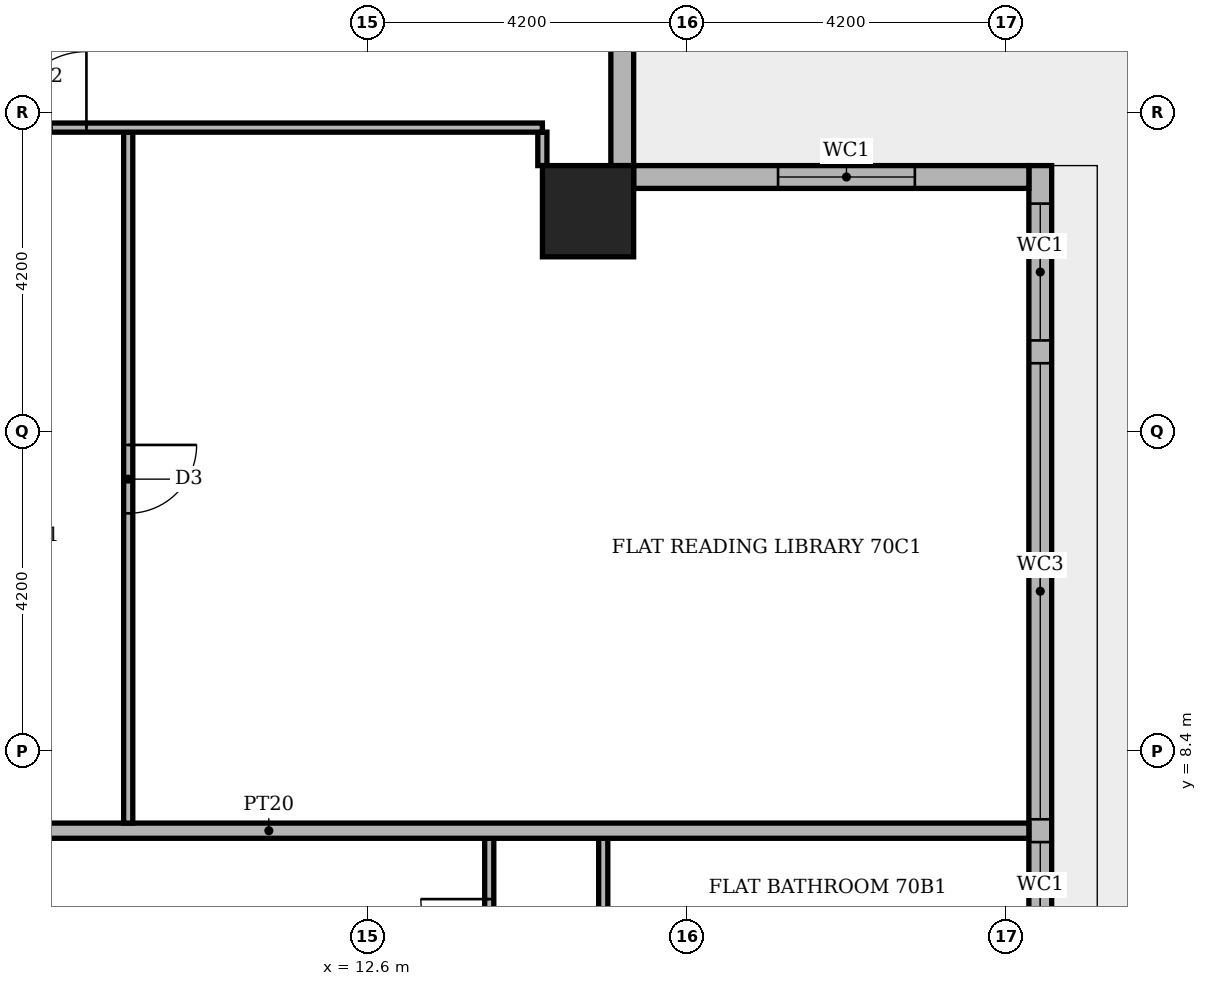
"""IFC4 building model, lengths in metres.
Left out: names, types, materials, properties, quantities, classifications, styles, units other than length and angle.
Written with IfcOpenShell. Run it as: python <this file> out.ifc"""

import sys

from ifc_helpers import new_model, si_unit, direction, frame, frame_2d, origin, origin_2d, place, context, subcontext, project, spatial, rectangle, extrude, element, fill, save


model = new_model("IFC4")
c1 = context("Model", 3, precision=1e-05, world=origin(), true_north=direction((0.0, 1.0)))
c2 = subcontext(c1, "Body", "Model", "MODEL_VIEW")
j1 = project(units=[si_unit("LENGTHUNIT", "METRE"), si_unit("PLANEANGLEUNIT", "RADIAN")], contexts=[c1])
p1 = place(None, origin())
s1 = spatial("IfcSite", under=j1, at=p1, CompositionType="ELEMENT")
p2 = place(p1, origin())
s2 = spatial("IfcBuilding", under=s1, at=p2, CompositionType="ELEMENT")
p3 = place(p2, frame((0.0, 0.0, 292.8)))
s3 = spatial("IfcBuildingStorey", under=s2, at=p3, CompositionType="ELEMENT", Elevation=292.8)
p4 = place(p3, frame((15.5, 15.5, -0.35), z_axis=(0.0, 0.0, 1.0), x_axis=(1.0, 0.0, 0.0)))
e1 = element("IfcColumn", 1, at=p4, inside=s3, PredefinedType="COLUMN", context=c2, shape_type="SweptSolid", body=[
    extrude(rectangle(XDim=1.2, YDim=1.2, at=origin_2d()), origin(), (0.0, 0.0, 1.0), 4.25),
])
p5 = place(p3, frame((21.45, -15.8, 0.0), z_axis=(0.0, 0.0, 1.0), x_axis=(0.0, 1.0, 0.0)))
e2 = element("IfcWall", 2, at=p5, inside=s3, PredefinedType="STANDARD", context=c2, shape_type="SweptSolid", body=[
    extrude(rectangle(XDim=31.9, YDim=0.3, at=frame_2d((15.95, 0.0))), origin(), (0.0, 0.0, 1.0), 3.55),
])
p6 = place(p5, frame((0.2, 0.0, 0.6)))
e3 = element("IfcOpeningElement", 3, at=p6, cuts=e2, PredefinedType="OPENING", context=c2, shape_type="SweptSolid", body=[
    extrude(rectangle(XDim=3.9, YDim=2.4, at=frame_2d((1.95, 1.2))), frame((0.0, 0.16, 0.0), z_axis=(0.0, -1.0, 0.0), x_axis=(1.0, 0.0, 0.0)), (0.0, 0.0, 1.0), 0.32),
])
p7 = place(p5, frame((4.4, 0.0, 0.0)))
e4 = element("IfcOpeningElement", 4, at=p7, cuts=e2, PredefinedType="OPENING", context=c2, shape_type="SweptSolid", body=[
    extrude(rectangle(XDim=3.9, YDim=2.4, at=frame_2d((1.95, 1.2))), frame((0.0, 0.16, 0.0), z_axis=(0.0, -1.0, 0.0), x_axis=(1.0, 0.0, 0.0)), (0.0, 0.0, 1.0), 0.32),
])
p8 = place(p5, frame((8.6, 0.0, 0.6)))
e5 = element("IfcOpeningElement", 5, at=p8, cuts=e2, PredefinedType="OPENING", context=c2, shape_type="SweptSolid", body=[
    extrude(rectangle(XDim=1.8, YDim=2.4, at=frame_2d((0.9, 1.2))), frame((0.0, 0.16, 0.0), z_axis=(0.0, -1.0, 0.0), x_axis=(1.0, 0.0, 0.0)), (0.0, 0.0, 1.0), 0.32),
])
p9 = place(p5, frame((10.7, 0.0, 0.6)))
e6 = element("IfcOpeningElement", 6, at=p9, cuts=e2, PredefinedType="OPENING", context=c2, shape_type="SweptSolid", body=[
    extrude(rectangle(XDim=1.8, YDim=2.4, at=frame_2d((0.9, 1.2))), frame((0.0, 0.16, 0.0), z_axis=(0.0, -1.0, 0.0), x_axis=(1.0, 0.0, 0.0)), (0.0, 0.0, 1.0), 0.32),
])
p10 = place(p5, frame((12.8, 0.0, 0.0)))
e7 = element("IfcOpeningElement", 7, at=p10, cuts=e2, PredefinedType="OPENING", context=c2, shape_type="SweptSolid", body=[
    extrude(rectangle(XDim=3.9, YDim=2.4, at=frame_2d((1.95, 1.2))), frame((0.0, 0.16, 0.0), z_axis=(0.0, -1.0, 0.0), x_axis=(1.0, 0.0, 0.0)), (0.0, 0.0, 1.0), 0.32),
])
p11 = place(p5, frame((17.0, 0.0, 0.6)))
e8 = element("IfcOpeningElement", 8, at=p11, cuts=e2, PredefinedType="OPENING", context=c2, shape_type="SweptSolid", body=[
    extrude(rectangle(XDim=1.8, YDim=2.4, at=frame_2d((0.9, 1.2))), frame((0.0, 0.16, 0.0), z_axis=(0.0, -1.0, 0.0), x_axis=(1.0, 0.0, 0.0)), (0.0, 0.0, 1.0), 0.32),
])
p12 = place(p5, frame((19.1, 0.0, 0.6)))
e9 = element("IfcOpeningElement", 9, at=p12, cuts=e2, PredefinedType="OPENING", context=c2, shape_type="SweptSolid", body=[
    extrude(rectangle(XDim=1.8, YDim=2.4, at=frame_2d((0.9, 1.2))), frame((0.0, 0.16, 0.0), z_axis=(0.0, -1.0, 0.0), x_axis=(1.0, 0.0, 0.0)), (0.0, 0.0, 1.0), 0.32),
])
p13 = place(p5, frame((21.2, 0.0, 0.6)))
e10 = element("IfcOpeningElement", 10, at=p13, cuts=e2, PredefinedType="OPENING", context=c2, shape_type="SweptSolid", body=[
    extrude(rectangle(XDim=1.8, YDim=2.4, at=frame_2d((0.9, 1.2))), frame((0.0, 0.16, 0.0), z_axis=(0.0, -1.0, 0.0), x_axis=(1.0, 0.0, 0.0)), (0.0, 0.0, 1.0), 0.32),
])
p14 = place(p5, frame((23.3, 0.0, 0.6)))
e11 = element("IfcOpeningElement", 11, at=p14, cuts=e2, PredefinedType="OPENING", context=c2, shape_type="SweptSolid", body=[
    extrude(rectangle(XDim=6.0, YDim=2.4, at=frame_2d((3.0, 1.2))), frame((0.0, 0.16, 0.0), z_axis=(0.0, -1.0, 0.0), x_axis=(1.0, 0.0, 0.0)), (0.0, 0.0, 1.0), 0.32),
])
p15 = place(p5, frame((29.6, 0.0, 0.6)))
e12 = element("IfcOpeningElement", 12, at=p15, cuts=e2, PredefinedType="OPENING", context=c2, shape_type="SweptSolid", body=[
    extrude(rectangle(XDim=1.8, YDim=2.4, at=frame_2d((0.9, 1.2))), frame((0.0, 0.16, 0.0), z_axis=(0.0, -1.0, 0.0), x_axis=(1.0, 0.0, 0.0)), (0.0, 0.0, 1.0), 0.32),
])
p16 = place(p3, frame((21.3, 15.95, 0.0), z_axis=(0.0, 0.0, 1.0), x_axis=(-1.0, 0.0, 0.0)))
e13 = element("IfcWall", 13, at=p16, inside=s3, PredefinedType="STANDARD", context=c2, shape_type="SweptSolid", body=[
    extrude(rectangle(XDim=5.2, YDim=0.3, at=frame_2d((2.6, 0.0))), origin(), (0.0, 0.0, 1.0), 3.55),
])
p17 = place(p16, frame((1.5, 0.0, 0.6)))
e14 = element("IfcOpeningElement", 14, at=p17, cuts=e13, PredefinedType="OPENING", context=c2, shape_type="SweptSolid", body=[
    extrude(rectangle(XDim=1.8, YDim=2.4, at=frame_2d((0.9, 1.2))), frame((0.0, 0.16, 0.0), z_axis=(0.0, -1.0, 0.0), x_axis=(1.0, 0.0, 0.0)), (0.0, 0.0, 1.0), 0.32),
])
p18 = place(p3, frame((15.95, 16.1, 0.0), z_axis=(0.0, 0.0, 1.0), x_axis=(0.0, 1.0, 0.0)))
e15 = element("IfcWall", 15, at=p18, inside=s3, PredefinedType="STANDARD", context=c2, shape_type="SweptSolid", body=[
    extrude(rectangle(XDim=5.5, YDim=0.3, at=frame_2d((2.75, 0.0))), origin(), (0.0, 0.0, 1.0), 3.55),
])
p19 = place(p18, frame((1.9, 0.0, 0.0)))
e16 = element("IfcOpeningElement", 16, at=p19, cuts=e15, PredefinedType="OPENING", context=c2, shape_type="SweptSolid", body=[
    extrude(rectangle(XDim=1.8, YDim=2.4, at=frame_2d((0.9, 1.2))), frame((0.0, 0.16, 0.0), z_axis=(0.0, -1.0, 0.0), x_axis=(1.0, 0.0, 0.0)), (0.0, 0.0, 1.0), 0.32),
])
p20 = place(p3, frame((14.2, 4.71, 0.0), z_axis=(0.0, 0.0, 1.0), x_axis=(0.0, 1.0, 0.0)))
e17 = element("IfcWall", 17, at=p20, inside=s3, PredefinedType="PARTITIONING", context=c2, shape_type="SweptSolid", body=[
    extrude(rectangle(XDim=2.54, YDim=0.12, at=frame_2d((1.27, 0.0))), origin(), (0.0, 0.0, 1.0), 3.55),
])
p21 = place(p20, frame((0.84, 0.0, 0.0)))
e18 = element("IfcOpeningElement", 18, at=p21, cuts=e17, PredefinedType="OPENING", context=c2, shape_type="SweptSolid", body=[
    extrude(rectangle(XDim=0.9, YDim=2.1, at=frame_2d((0.45, 1.05))), frame((0.0, 0.07, 0.0), z_axis=(0.0, -1.0, 0.0), x_axis=(1.0, 0.0, 0.0)), (0.0, 0.0, 1.0), 0.14),
])
p22 = place(p3, frame((15.7, 5.31, 0.0), z_axis=(0.0, 0.0, 1.0), x_axis=(0.0, 1.0, 0.0)))
e19 = element("IfcWall", 19, at=p22, inside=s3, PredefinedType="PARTITIONING", context=c2, shape_type="SweptSolid", body=[
    extrude(rectangle(XDim=1.94, YDim=0.12, at=frame_2d((0.97, 0.0))), origin(), (0.0, 0.0, 1.0), 3.55),
])
p23 = place(p3, frame((1.3, 7.35, 0.0), z_axis=(0.0, 0.0, 1.0), x_axis=(1.0, 0.0, 0.0)))
e20 = element("IfcWall", 20, at=p23, inside=s3, PredefinedType="PARTITIONING", context=c2, shape_type="SweptSolid", body=[
    extrude(rectangle(XDim=20.0, YDim=0.2, at=frame_2d((10.0, 0.0))), origin(), (0.0, 0.0, 1.0), 3.55),
])
p24 = place(p23, frame((3.4, 0.0, 0.0)))
e21 = element("IfcOpeningElement", 21, at=p24, cuts=e20, PredefinedType="OPENING", context=c2, shape_type="SweptSolid", body=[
    extrude(rectangle(XDim=1.1, YDim=2.4, at=frame_2d((0.55, 1.2))), frame((0.0, 0.11, 0.0), z_axis=(0.0, -1.0, 0.0), x_axis=(1.0, 0.0, 0.0)), (0.0, 0.0, 1.0), 0.22),
])
p25 = place(p3, frame((9.45, 7.45, 0.0), z_axis=(0.0, 0.0, 1.0), x_axis=(0.0, 1.0, 0.0)))
e22 = element("IfcWall", 22, at=p25, inside=s3, PredefinedType="PARTITIONING", context=c2, shape_type="SweptSolid", body=[
    extrude(rectangle(XDim=9.09, YDim=0.12, at=frame_2d((4.545, 0.0))), origin(), (0.0, 0.0, 1.0), 3.55),
])
p26 = place(p25, frame((4.075, 0.0, 0.0)))
e23 = element("IfcOpeningElement", 23, at=p26, cuts=e22, PredefinedType="OPENING", context=c2, shape_type="SweptSolid", body=[
    extrude(rectangle(XDim=0.9, YDim=2.1, at=frame_2d((0.45, 1.05))), frame((0.0, 0.07, 0.0), z_axis=(0.0, -1.0, 0.0), x_axis=(1.0, 0.0, 0.0)), (0.0, 0.0, 1.0), 0.14),
])
p27 = place(p3, frame((14.899, 16.1, 0.0), z_axis=(0.0, 0.0, 1.0), x_axis=(0.0, 1.0, 0.0)))
e24 = element("IfcWall", 24, at=p27, inside=s3, PredefinedType="PARTITIONING", context=c2, shape_type="SweptSolid", body=[
    extrude(rectangle(XDim=0.44, YDim=0.12, at=frame_2d((0.22, 0.0))), origin(), (0.0, 0.0, 1.0), 3.55),
])
p28 = place(p3, frame((-7.25, 16.6, 0.0), z_axis=(0.0, 0.0, 1.0), x_axis=(1.0, 0.0, 0.0)))
e25 = element("IfcWall", 25, at=p28, inside=s3, PredefinedType="PARTITIONING", context=c2, shape_type="SweptSolid", body=[
    extrude(rectangle(XDim=22.149, YDim=0.12, at=frame_2d((11.074, 0.0))), origin(), (0.0, 0.0, 1.0), 3.55),
])
p29 = place(p28, frame((15.15, 0.0, 0.0)))
e26 = element("IfcOpeningElement", 26, at=p29, cuts=e25, PredefinedType="OPENING", context=c2, shape_type="SweptSolid", body=[
    extrude(rectangle(XDim=1.0, YDim=2.1, at=frame_2d((0.5, 1.05))), frame((0.0, 0.07, 0.0), z_axis=(0.0, -1.0, 0.0), x_axis=(1.0, 0.0, 0.0)), (0.0, 0.0, 1.0), 0.14),
])
p30 = place(p28, frame((10.95, 0.0, 0.0)))
e27 = element("IfcOpeningElement", 27, at=p30, cuts=e25, PredefinedType="OPENING", context=c2, shape_type="SweptSolid", body=[
    extrude(rectangle(XDim=1.0, YDim=2.1, at=frame_2d((0.5, 1.05))), frame((0.0, 0.07, 0.0), z_axis=(0.0, -1.0, 0.0), x_axis=(1.0, 0.0, 0.0)), (0.0, 0.0, 1.0), 0.14),
])
p31 = place(p28, frame((5.75, 0.0, 0.0)))
e28 = element("IfcOpeningElement", 28, at=p31, cuts=e25, PredefinedType="OPENING", context=c2, shape_type="SweptSolid", body=[
    extrude(rectangle(XDim=0.9, YDim=2.1, at=frame_2d((0.45, 1.05))), frame((0.0, 0.07, 0.0), z_axis=(0.0, -1.0, 0.0), x_axis=(1.0, 0.0, 0.0)), (0.0, 0.0, 1.0), 0.14),
])
p32 = place(p13, origin())
e29 = element("IfcWindow", 29, at=p32, inside=s3, PartitioningType="SINGLE_PANEL", PredefinedType="WINDOW", context=c2, shape_type="SweptSolid", body=[
    extrude(rectangle(XDim=1.8, YDim=2.4, at=frame_2d((0.9, 1.2))), frame((0.0, 0.03, 0.0), z_axis=(0.0, -1.0, 0.0), x_axis=(1.0, 0.0, 0.0)), (0.0, 0.0, 1.0), 0.06),
])
fill(e10, e29)
p33 = place(p14, origin())
e30 = element("IfcWindow", 30, at=p33, inside=s3, PartitioningType="SINGLE_PANEL", PredefinedType="WINDOW", context=c2, shape_type="SweptSolid", body=[
    extrude(rectangle(XDim=6.0, YDim=2.4, at=frame_2d((3.0, 1.2))), frame((0.0, 0.03, 0.0), z_axis=(0.0, -1.0, 0.0), x_axis=(1.0, 0.0, 0.0)), (0.0, 0.0, 1.0), 0.06),
])
fill(e11, e30)
p34 = place(p15, origin())
e31 = element("IfcWindow", 31, at=p34, inside=s3, PartitioningType="SINGLE_PANEL", PredefinedType="WINDOW", context=c2, shape_type="SweptSolid", body=[
    extrude(rectangle(XDim=1.8, YDim=2.4, at=frame_2d((0.9, 1.2))), frame((0.0, 0.03, 0.0), z_axis=(0.0, -1.0, 0.0), x_axis=(1.0, 0.0, 0.0)), (0.0, 0.0, 1.0), 0.06),
])
fill(e12, e31)
p35 = place(p17, origin())
e32 = element("IfcWindow", 32, at=p35, inside=s3, PartitioningType="SINGLE_PANEL", PredefinedType="WINDOW", context=c2, shape_type="SweptSolid", body=[
    extrude(rectangle(XDim=1.8, YDim=2.4, at=frame_2d((0.9, 1.2))), frame((0.0, 0.03, 0.0), z_axis=(0.0, -1.0, 0.0), x_axis=(1.0, 0.0, 0.0)), (0.0, 0.0, 1.0), 0.06),
])
fill(e14, e32)
p36 = place(p21, origin())
e33 = element("IfcDoor", 33, at=p36, inside=s3, OperationType="SINGLE_SWING_RIGHT", PredefinedType="DOOR", context=c2, shape_type="SweptSolid", body=[
    extrude(rectangle(XDim=0.9, YDim=2.1, at=frame_2d((0.45, 1.05))), frame((0.0, 0.025, 0.0), z_axis=(0.0, -1.0, 0.0), x_axis=(1.0, 0.0, 0.0)), (0.0, 0.0, 1.0), 0.05),
])
fill(e18, e33)
p37 = place(p26, frame((0.9, 0.0, 0.0), z_axis=(0.0, 0.0, 1.0), x_axis=(-1.0, 0.0, 0.0)))
e34 = element("IfcDoor", 34, at=p37, inside=s3, OperationType="SINGLE_SWING_RIGHT", PredefinedType="DOOR", context=c2, shape_type="SweptSolid", body=[
    extrude(rectangle(XDim=0.9, YDim=2.1, at=frame_2d((0.45, 1.05))), frame((0.0, 0.025, 0.0), z_axis=(0.0, -1.0, 0.0), x_axis=(1.0, 0.0, 0.0)), (0.0, 0.0, 1.0), 0.05),
])
fill(e23, e34)
p38 = place(p29, origin())
e35 = element("IfcDoor", 35, at=p38, inside=s3, OperationType="SINGLE_SWING_RIGHT", PredefinedType="DOOR", context=c2, shape_type="SweptSolid", body=[
    extrude(rectangle(XDim=1.0, YDim=2.1, at=frame_2d((0.5, 1.05))), frame((0.0, 0.025, 0.0), z_axis=(0.0, -1.0, 0.0), x_axis=(1.0, 0.0, 0.0)), (0.0, 0.0, 1.0), 0.05),
])
fill(e26, e35)
save(model, sys.argv[1])
